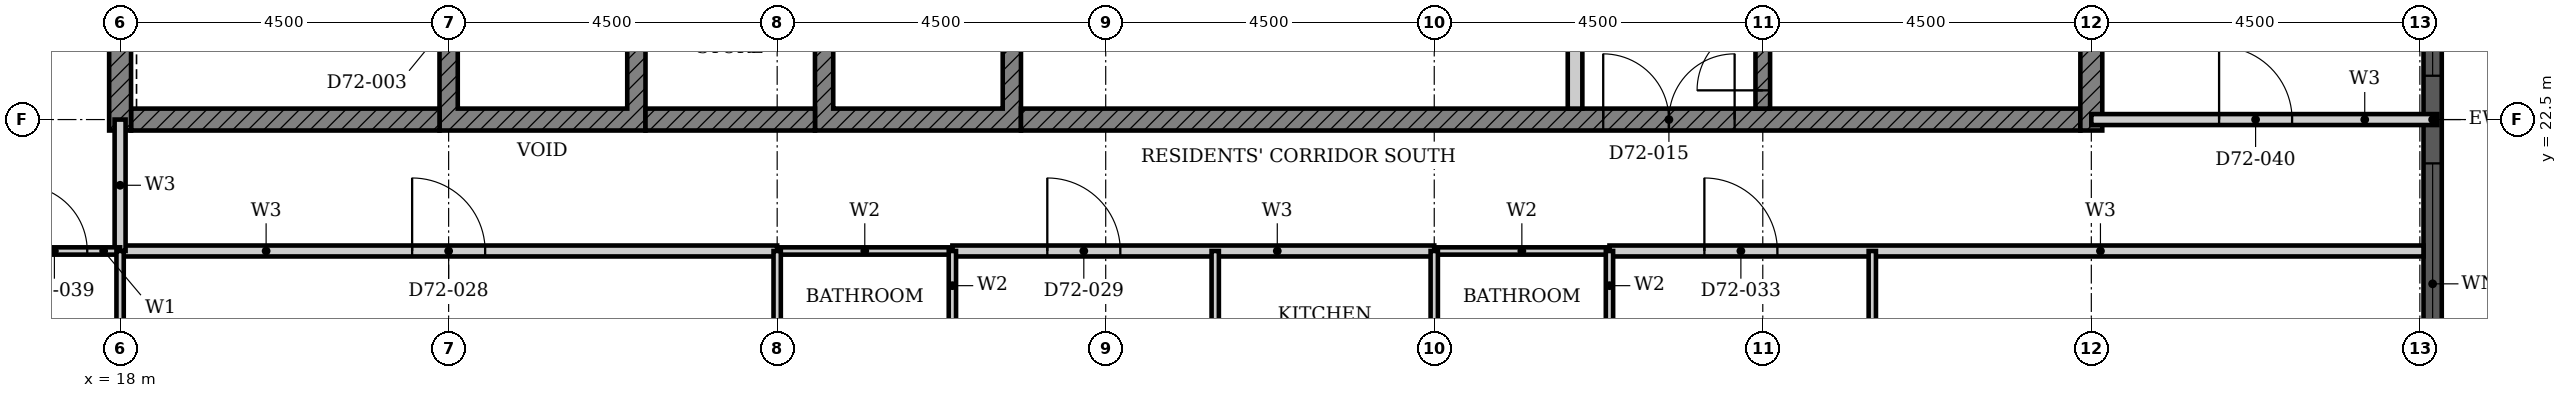
"""IFC4 building model, lengths in metres.
Left out: names, types, materials, properties, quantities, classifications, styles, units other than length and angle.
Written with IfcOpenShell. Run it as: python <this file> out.ifc"""

import sys

from ifc_helpers import new_model, si_unit, direction, frame, frame_2d, origin, place, context, subcontext, project, spatial, polyline, rectangle, outline, extrude, element, fill, save


model = new_model("IFC4")
c1 = context("Model", 3, precision=1e-05, world=origin(), true_north=direction((0.0, 1.0)))
c2 = subcontext(c1, "Body", "Model", "MODEL_VIEW")
j1 = project(units=[si_unit("LENGTHUNIT", "METRE"), si_unit("PLANEANGLEUNIT", "RADIAN")], contexts=[c1])
p1 = place(None, origin())
s1 = spatial("IfcSite", under=j1, at=p1, CompositionType="ELEMENT")
p2 = place(p1, origin())
s2 = spatial("IfcBuilding", under=s1, at=p2, CompositionType="ELEMENT")
p3 = place(p2, frame((0.0, 0.0, 283.4)))
s3 = spatial("IfcBuildingStorey", under=s2, at=p3, CompositionType="ELEMENT", Elevation=283.4)
p4 = place(p3, frame((49.675, 18.3, 0.0), z_axis=(0.0, 0.0, 1.0), x_axis=(0.0, 1.0, 0.0)))
e1 = element("IfcWall", 1, at=p4, inside=s3, PredefinedType="SOLIDWALL", context=c2, shape_type="SweptSolid", body=[
    extrude(rectangle(XDim=8.4, YDim=0.25, at=frame_2d((4.2, 0.0))), origin(), (0.0, 0.0, 1.0), 3.7),
])
p5 = place(p4, frame((0.3, 0.0, 0.45)))
e2 = element("IfcOpeningElement", 2, at=p5, cuts=e1, PredefinedType="OPENING", context=c2, shape_type="SweptSolid", body=[
    extrude(rectangle(XDim=3.3, YDim=2.3, at=frame_2d((1.65, 1.15))), frame((0.0, 0.135, 0.0), z_axis=(0.0, -1.0, 0.0), x_axis=(1.0, 0.0, 0.0)), (0.0, 0.0, 1.0), 0.27),
])
p6 = place(p4, frame((4.8, 0.0, 0.45)))
e3 = element("IfcOpeningElement", 3, at=p6, cuts=e1, PredefinedType="OPENING", context=c2, shape_type="SweptSolid", body=[
    extrude(rectangle(XDim=3.3, YDim=2.3, at=frame_2d((1.65, 1.15))), frame((0.0, 0.135, 0.0), z_axis=(0.0, -1.0, 0.0), x_axis=(1.0, 0.0, 0.0)), (0.0, 0.0, 1.0), 0.27),
])
p7 = place(p3, origin())
e4 = element("IfcWall", 4, at=p7, inside=s3, PredefinedType="SHEAR", context=c2, shape_type="SweptSolid", body=[
    extrude(outline(polyline([(22.375, 22.35), (25.197, 22.35), (25.197, 25.275), (24.947, 25.275), (24.947, 22.65), (22.625, 22.65), (22.625, 25.275), (22.375, 25.275), (22.375, 22.35)])), origin(), (0.0, 0.0, 1.0), 3.4),
])
p8 = place(p3, origin())
e5 = element("IfcWall", 5, at=p8, inside=s3, PredefinedType="SHEAR", context=c2, shape_type="SweptSolid", body=[
    extrude(outline(polyline([(27.518, 22.35), (30.339, 22.35), (30.339, 25.275), (30.089, 25.275), (30.089, 22.65), (27.768, 22.65), (27.768, 25.275), (27.518, 25.275), (27.518, 22.35)])), origin(), (0.0, 0.0, 1.0), 3.4),
])
p9 = place(p3, frame((18.15, 22.5, 0.0), z_axis=(0.0, 0.0, 1.0), x_axis=(1.0, 0.0, 0.0)))
e6 = element("IfcWall", 6, at=p9, inside=s3, PredefinedType="SHEAR", context=c2, shape_type="SweptSolid", body=[
    extrude(rectangle(XDim=4.225, YDim=0.3, at=frame_2d((2.113, 0.0))), origin(), (0.0, 0.0, 1.0), 3.4),
])
p10 = place(p3, frame((25.197, 22.5, 0.0), z_axis=(0.0, 0.0, 1.0), x_axis=(1.0, 0.0, 0.0)))
e7 = element("IfcWall", 7, at=p10, inside=s3, PredefinedType="SHEAR", context=c2, shape_type="SweptSolid", body=[
    extrude(rectangle(XDim=2.321, YDim=0.3, at=frame_2d((1.161, 0.0))), origin(), (0.0, 0.0, 1.0), 3.4),
])
p11 = place(p3, frame((30.339, 22.5, 0.0), z_axis=(0.0, 0.0, 1.0), x_axis=(1.0, 0.0, 0.0)))
e8 = element("IfcWall", 8, at=p11, inside=s3, PredefinedType="SHEAR", context=c2, shape_type="SweptSolid", body=[
    extrude(rectangle(XDim=14.511, YDim=0.3, at=frame_2d((7.255, 0.0))), origin(), (0.0, 0.0, 1.0), 3.4),
])
p12 = place(p11, frame((7.975, 0.0, 0.0)))
e9 = element("IfcOpeningElement", 9, at=p12, cuts=e8, PredefinedType="OPENING", context=c2, shape_type="SweptSolid", body=[
    extrude(rectangle(XDim=1.8, YDim=2.1, at=frame_2d((0.9, 1.05))), frame((0.0, 0.16, 0.0), z_axis=(0.0, -1.0, 0.0), x_axis=(1.0, 0.0, 0.0)), (0.0, 0.0, 1.0), 0.32),
])
for number, where, z_axis, x_axis in (
    (10, (18.0, 22.35, 0.0), (0.0, 0.0, 1.0), (0.0, 1.0, 0.0)),
    (11, (45.0, 22.35, 0.0), (0.0, 0.0, 1.0), (0.0, 1.0, 0.0)),
):
    element("IfcWall", number, at=place(p3, frame(where, z_axis=z_axis, x_axis=x_axis)), inside=s3, PredefinedType="SHEAR", context=c2, shape_type="SweptSolid", body=[
        extrude(rectangle(XDim=9.3, YDim=0.3, at=frame_2d((4.65, 0.0))), origin(), (0.0, 0.0, 1.0), 3.4),
    ])
p13 = place(p3, frame((37.928, 22.65, 0.0), z_axis=(0.0, 0.0, 1.0), x_axis=(0.0, 1.0, 0.0)))
e12 = element("IfcWall", 12, at=p13, inside=s3, PredefinedType="PARTITIONING", context=c2, shape_type="SweptSolid", body=[
    extrude(rectangle(XDim=2.625, YDim=0.2, at=frame_2d((1.312, 0.0))), origin(), (0.0, 0.0, 1.0), 3.4),
])
p14 = place(p3, frame((40.5, 22.65, 0.0), z_axis=(0.0, 0.0, 1.0), x_axis=(0.0, 1.0, 0.0)))
e13 = element("IfcWall", 13, at=p14, inside=s3, PredefinedType="SHEAR", context=c2, shape_type="SweptSolid", body=[
    extrude(rectangle(XDim=5.825, YDim=0.2, at=frame_2d((2.913, 0.0))), origin(), (0.0, 0.0, 1.0), 3.4),
])
p15 = place(p14, frame((0.25, 0.0, 0.0)))
e14 = element("IfcOpeningElement", 14, at=p15, cuts=e13, PredefinedType="OPENING", context=c2, shape_type="SweptSolid", body=[
    extrude(rectangle(XDim=1.8, YDim=2.1, at=frame_2d((0.9, 1.05))), frame((0.0, 0.11, 0.0), z_axis=(0.0, -1.0, 0.0), x_axis=(1.0, 0.0, 0.0)), (0.0, 0.0, 1.0), 0.22),
])
p16 = place(p3, frame((18.0, 20.7, 0.0), z_axis=(0.0, 0.0, 1.0), x_axis=(1.0, 0.0, 0.0)))
e15 = element("IfcWall", 15, at=p16, inside=s3, PredefinedType="PARTITIONING", context=c2, shape_type="SweptSolid", body=[
    extrude(rectangle(XDim=9.0, YDim=0.15, at=frame_2d((4.5, 0.0))), origin(), (0.0, 0.0, 1.0), 3.4),
])
p17 = place(p16, frame((4.0, 0.0, 0.0)))
e16 = element("IfcOpeningElement", 16, at=p17, cuts=e15, PredefinedType="OPENING", context=c2, shape_type="SweptSolid", body=[
    extrude(rectangle(XDim=1.0, YDim=2.1, at=frame_2d((0.5, 1.05))), frame((0.0, 0.085, 0.0), z_axis=(0.0, -1.0, 0.0), x_axis=(1.0, 0.0, 0.0)), (0.0, 0.0, 1.0), 0.17),
])
p18 = place(p3, frame((29.4, 20.7, 0.0), z_axis=(0.0, 0.0, 1.0), x_axis=(1.0, 0.0, 0.0)))
e17 = element("IfcWall", 17, at=p18, inside=s3, PredefinedType="PARTITIONING", context=c2, shape_type="SweptSolid", body=[
    extrude(rectangle(XDim=6.6, YDim=0.15, at=frame_2d((3.3, 0.0))), origin(), (0.0, 0.0, 1.0), 3.4),
])
p19 = place(p18, frame((1.3, 0.0, 0.0)))
e18 = element("IfcOpeningElement", 18, at=p19, cuts=e17, PredefinedType="OPENING", context=c2, shape_type="SweptSolid", body=[
    extrude(rectangle(XDim=1.0, YDim=2.2, at=frame_2d((0.5, 1.1))), frame((0.0, 0.085, 0.0), z_axis=(0.0, -1.0, 0.0), x_axis=(1.0, 0.0, 0.0)), (0.0, 0.0, 1.0), 0.17),
])
p20 = place(p3, frame((38.4, 20.7, 0.0), z_axis=(0.0, 0.0, 1.0), x_axis=(1.0, 0.0, 0.0)))
e19 = element("IfcWall", 19, at=p20, inside=s3, PredefinedType="PARTITIONING", context=c2, shape_type="SweptSolid", body=[
    extrude(rectangle(XDim=11.15, YDim=0.15, at=frame_2d((5.575, 0.0))), origin(), (0.0, 0.0, 1.0), 3.4),
])
p21 = place(p20, frame((1.3, 0.0, 0.0)))
e20 = element("IfcOpeningElement", 20, at=p21, cuts=e19, PredefinedType="OPENING", context=c2, shape_type="SweptSolid", body=[
    extrude(rectangle(XDim=1.0, YDim=2.2, at=frame_2d((0.5, 1.1))), frame((0.0, 0.085, 0.0), z_axis=(0.0, -1.0, 0.0), x_axis=(1.0, 0.0, 0.0)), (0.0, 0.0, 1.0), 0.17),
])
p22 = place(p3, frame((45.0, 22.5, 0.0), z_axis=(0.0, 0.0, 1.0), x_axis=(1.0, 0.0, 0.0)))
e21 = element("IfcWall", 21, at=p22, inside=s3, PredefinedType="PARTITIONING", context=c2, shape_type="SweptSolid", body=[
    extrude(rectangle(XDim=4.74, YDim=0.15, at=frame_2d((2.37, 0.0))), origin(), (0.0, 0.0, 1.0), 3.4),
])
p23 = place(p22, frame((1.75, 0.0, 0.0)))
e22 = element("IfcOpeningElement", 22, at=p23, cuts=e21, PredefinedType="OPENING", context=c2, shape_type="SweptSolid", body=[
    extrude(rectangle(XDim=1.0, YDim=2.2, at=frame_2d((0.5, 1.1))), frame((0.0, 0.085, 0.0), z_axis=(0.0, -1.0, 0.0), x_axis=(1.0, 0.0, 0.0)), (0.0, 0.0, 1.0), 0.17),
])
p24 = place(p3, frame((18.0, 20.7, 0.0), z_axis=(0.0, 0.0, 1.0), x_axis=(0.0, 1.0, 0.0)))
e23 = element("IfcWall", 23, at=p24, inside=s3, PredefinedType="PARTITIONING", context=c2, shape_type="SweptSolid", body=[
    extrude(rectangle(XDim=1.8, YDim=0.15, at=frame_2d((0.9, 0.0))), origin(), (0.0, 0.0, 1.0), 3.4),
])
p25 = place(p3, frame((16.2, 20.7, 0.0), z_axis=(0.0, 0.0, 1.0), x_axis=(1.0, 0.0, 0.0)))
e24 = element("IfcWall", 24, at=p25, inside=s3, PredefinedType="PARTITIONING", context=c2, shape_type="SweptSolid", body=[
    extrude(rectangle(XDim=1.8, YDim=0.1, at=frame_2d((0.9, 0.0))), origin(), (0.0, 0.0, 1.0), 3.4),
])
p26 = place(p25, frame((0.45, 0.0, 0.0)))
e25 = element("IfcOpeningElement", 25, at=p26, cuts=e24, PredefinedType="OPENING", context=c2, shape_type="SweptSolid", body=[
    extrude(rectangle(XDim=0.9, YDim=2.1, at=frame_2d((0.45, 1.05))), frame((0.0, 0.06, 0.0), z_axis=(0.0, -1.0, 0.0), x_axis=(1.0, 0.0, 0.0)), (0.0, 0.0, 1.0), 0.12),
])
p27 = place(p3, frame((18.0, 15.8, 0.0), z_axis=(0.0, 0.0, 1.0), x_axis=(0.0, 1.0, 0.0)))
e26 = element("IfcWall", 26, at=p27, inside=s3, PredefinedType="PARTITIONING", context=c2, shape_type="SweptSolid", body=[
    extrude(rectangle(XDim=4.9, YDim=0.1, at=frame_2d((2.45, 0.0))), origin(), (0.0, 0.0, 1.0), 3.4),
])
for number, where, z_axis, x_axis in (
    (27, (33.0, 18.0, 0.0), (0.0, 0.0, 1.0), (0.0, 1.0, 0.0)),
    (28, (42.0, 18.0, 0.0), (0.0, 0.0, 1.0), (0.0, 1.0, 0.0)),
):
    element("IfcWall", number, at=place(p3, frame(where, z_axis=z_axis, x_axis=x_axis)), inside=s3, PredefinedType="PARTITIONING", context=c2, shape_type="SweptSolid", body=[
        extrude(rectangle(XDim=2.7, YDim=0.1, at=frame_2d((1.35, 0.0))), origin(), (0.0, 0.0, 1.0), 3.4),
    ])
for number, where, z_axis, x_axis in (
    (29, (27.0, 20.7, 0.0), (0.0, 0.0, 1.0), (1.0, 0.0, 0.0)),
    (30, (36.0, 20.7, 0.0), (0.0, 0.0, 1.0), (1.0, 0.0, 0.0)),
):
    element("IfcWall", number, at=place(p3, frame(where, z_axis=z_axis, x_axis=x_axis)), inside=s3, PredefinedType="PARTITIONING", context=c2, shape_type="SweptSolid", body=[
        extrude(rectangle(XDim=2.4, YDim=0.1, at=frame_2d((1.2, 0.0))), origin(), (0.0, 0.0, 1.0), 3.4),
    ])
p28 = place(p3, frame((27.0, 18.0, 0.0), z_axis=(0.0, 0.0, 1.0), x_axis=(0.0, 1.0, 0.0)))
e31 = element("IfcWall", 31, at=p28, inside=s3, PredefinedType="PARTITIONING", context=c2, shape_type="SweptSolid", body=[
    extrude(rectangle(XDim=2.7, YDim=0.1, at=frame_2d((1.35, 0.0))), origin(), (0.0, 0.0, 1.0), 3.4),
])
p29 = place(p3, frame((29.4, 18.0, 0.0), z_axis=(0.0, 0.0, 1.0), x_axis=(0.0, 1.0, 0.0)))
e32 = element("IfcWall", 32, at=p29, inside=s3, PredefinedType="PARTITIONING", context=c2, shape_type="SweptSolid", body=[
    extrude(rectangle(XDim=2.7, YDim=0.1, at=frame_2d((1.35, 0.0))), origin(), (0.0, 0.0, 1.0), 3.4),
])
p30 = place(p29, frame((0.95, 0.0, 0.0)))
e33 = element("IfcOpeningElement", 33, at=p30, cuts=e32, PredefinedType="OPENING", context=c2, shape_type="SweptSolid", body=[
    extrude(rectangle(XDim=0.8, YDim=2.1, at=frame_2d((0.4, 1.05))), frame((0.0, 0.06, 0.0), z_axis=(0.0, -1.0, 0.0), x_axis=(1.0, 0.0, 0.0)), (0.0, 0.0, 1.0), 0.12),
])
p31 = place(p3, frame((36.0, 18.0, 0.0), z_axis=(0.0, 0.0, 1.0), x_axis=(0.0, 1.0, 0.0)))
e34 = element("IfcWall", 34, at=p31, inside=s3, PredefinedType="PARTITIONING", context=c2, shape_type="SweptSolid", body=[
    extrude(rectangle(XDim=2.7, YDim=0.1, at=frame_2d((1.35, 0.0))), origin(), (0.0, 0.0, 1.0), 3.4),
])
p32 = place(p3, frame((38.4, 18.0, 0.0), z_axis=(0.0, 0.0, 1.0), x_axis=(0.0, 1.0, 0.0)))
e35 = element("IfcWall", 35, at=p32, inside=s3, PredefinedType="PARTITIONING", context=c2, shape_type="SweptSolid", body=[
    extrude(rectangle(XDim=2.7, YDim=0.1, at=frame_2d((1.35, 0.0))), origin(), (0.0, 0.0, 1.0), 3.4),
])
p33 = place(p32, frame((0.95, 0.0, 0.0)))
e36 = element("IfcOpeningElement", 36, at=p33, cuts=e35, PredefinedType="OPENING", context=c2, shape_type="SweptSolid", body=[
    extrude(rectangle(XDim=0.8, YDim=2.1, at=frame_2d((0.4, 1.05))), frame((0.0, 0.06, 0.0), z_axis=(0.0, -1.0, 0.0), x_axis=(1.0, 0.0, 0.0)), (0.0, 0.0, 1.0), 0.12),
])
p34 = place(p5, origin())
e37 = element("IfcWindow", 37, at=p34, inside=s3, PartitioningType="SINGLE_PANEL", PredefinedType="WINDOW", context=c2, shape_type="SweptSolid", body=[
    extrude(rectangle(XDim=3.3, YDim=2.3, at=frame_2d((1.65, 1.15))), frame((0.0, 0.03, 0.0), z_axis=(0.0, -1.0, 0.0), x_axis=(1.0, 0.0, 0.0)), (0.0, 0.0, 1.0), 0.06),
])
fill(e2, e37)
p35 = place(p6, origin())
e38 = element("IfcWindow", 38, at=p35, inside=s3, PartitioningType="SINGLE_PANEL", PredefinedType="WINDOW", context=c2, shape_type="SweptSolid", body=[
    extrude(rectangle(XDim=3.3, YDim=2.3, at=frame_2d((1.65, 1.15))), frame((0.0, 0.03, 0.0), z_axis=(0.0, -1.0, 0.0), x_axis=(1.0, 0.0, 0.0)), (0.0, 0.0, 1.0), 0.06),
])
fill(e3, e38)
p36 = place(p15, origin())
e39 = element("IfcDoor", 39, at=p36, inside=s3, OperationType="DOUBLE_DOOR_SINGLE_SWING", PredefinedType="DOOR", context=c2, shape_type="SweptSolid", body=[
    extrude(rectangle(XDim=1.8, YDim=2.1, at=frame_2d((0.9, 1.05))), frame((0.0, 0.025, 0.0), z_axis=(0.0, -1.0, 0.0), x_axis=(1.0, 0.0, 0.0)), (0.0, 0.0, 1.0), 0.05),
])
fill(e14, e39)
p37 = place(p12, origin())
e40 = element("IfcDoor", 40, at=p37, inside=s3, OperationType="DOUBLE_DOOR_SINGLE_SWING", PredefinedType="DOOR", context=c2, shape_type="SweptSolid", body=[
    extrude(rectangle(XDim=1.8, YDim=2.1, at=frame_2d((0.9, 1.05))), frame((0.0, 0.025, 0.0), z_axis=(0.0, -1.0, 0.0), x_axis=(1.0, 0.0, 0.0)), (0.0, 0.0, 1.0), 0.05),
])
fill(e9, e40)
p38 = place(p17, origin())
e41 = element("IfcDoor", 41, at=p38, inside=s3, OperationType="SINGLE_SWING_RIGHT", PredefinedType="DOOR", context=c2, shape_type="SweptSolid", body=[
    extrude(rectangle(XDim=1.0, YDim=2.1, at=frame_2d((0.5, 1.05))), frame((0.0, 0.025, 0.0), z_axis=(0.0, -1.0, 0.0), x_axis=(1.0, 0.0, 0.0)), (0.0, 0.0, 1.0), 0.05),
])
fill(e16, e41)
p39 = place(p19, origin())
e42 = element("IfcDoor", 42, at=p39, inside=s3, OperationType="SINGLE_SWING_LEFT", PredefinedType="DOOR", context=c2, shape_type="SweptSolid", body=[
    extrude(rectangle(XDim=1.0, YDim=2.2, at=frame_2d((0.5, 1.1))), frame((0.0, 0.025, 0.0), z_axis=(0.0, -1.0, 0.0), x_axis=(1.0, 0.0, 0.0)), (0.0, 0.0, 1.0), 0.05),
])
fill(e18, e42)
p40 = place(p21, origin())
e43 = element("IfcDoor", 43, at=p40, inside=s3, OperationType="SINGLE_SWING_RIGHT", PredefinedType="DOOR", context=c2, shape_type="SweptSolid", body=[
    extrude(rectangle(XDim=1.0, YDim=2.2, at=frame_2d((0.5, 1.1))), frame((0.0, 0.025, 0.0), z_axis=(0.0, -1.0, 0.0), x_axis=(1.0, 0.0, 0.0)), (0.0, 0.0, 1.0), 0.05),
])
fill(e20, e43)
p41 = place(p26, origin())
e44 = element("IfcDoor", 44, at=p41, inside=s3, OperationType="SINGLE_SWING_RIGHT", PredefinedType="DOOR", context=c2, shape_type="SweptSolid", body=[
    extrude(rectangle(XDim=0.9, YDim=2.1, at=frame_2d((0.45, 1.05))), frame((0.0, 0.025, 0.0), z_axis=(0.0, -1.0, 0.0), x_axis=(1.0, 0.0, 0.0)), (0.0, 0.0, 1.0), 0.05),
])
fill(e25, e44)
p42 = place(p23, origin())
e45 = element("IfcDoor", 45, at=p42, inside=s3, OperationType="SINGLE_SWING_LEFT", PredefinedType="DOOR", context=c2, shape_type="SweptSolid", body=[
    extrude(rectangle(XDim=1.0, YDim=2.2, at=frame_2d((0.5, 1.1))), frame((0.0, 0.025, 0.0), z_axis=(0.0, -1.0, 0.0), x_axis=(1.0, 0.0, 0.0)), (0.0, 0.0, 1.0), 0.05),
])
fill(e22, e45)
save(model, sys.argv[1])
